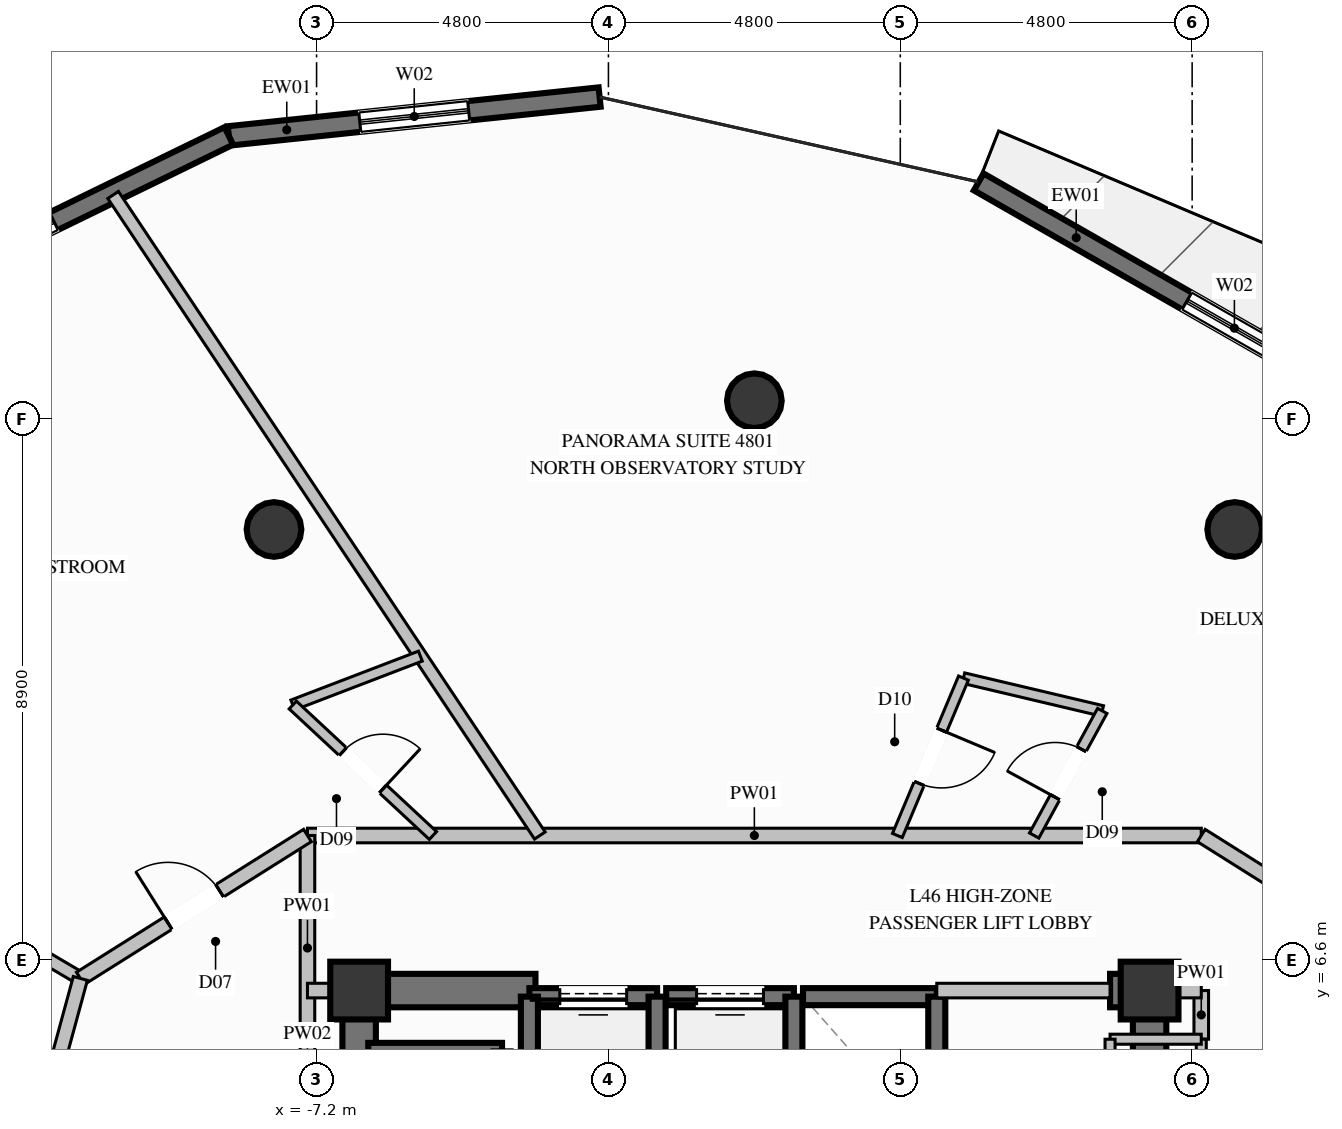
"""IFC4 building model, lengths in metres.
Left out: names, types, materials, properties, quantities, classifications, styles, units other than length and angle.
Written with IfcOpenShell. Run it as: python <this file> out.ifc"""

import sys

from ifc_helpers import new_model, si_unit, direction, frame, frame_2d, origin, origin_2d, place, context, subcontext, project, spatial, rectangle, circle, extrude, element, fill, save


model = new_model("IFC4")
c1 = context("Model", 3, precision=1e-05, world=origin(), true_north=direction((0.0, 1.0)))
c2 = subcontext(c1, "Body", "Model", "MODEL_VIEW")
j1 = project(units=[si_unit("LENGTHUNIT", "METRE"), si_unit("PLANEANGLEUNIT", "RADIAN")], contexts=[c1])
p1 = place(None, origin())
s1 = spatial("IfcSite", under=j1, at=p1, CompositionType="ELEMENT")
p2 = place(p1, origin())
s2 = spatial("IfcBuilding", under=s1, at=p2, CompositionType="ELEMENT")
p3 = place(p2, frame((0.0, 0.0, 180.4)))
s3 = spatial("IfcBuildingStorey", under=s2, at=p3, CompositionType="ELEMENT", Elevation=180.4)
for number, where, z_axis, x_axis in (
    (1, (6.5, 6.1, 0.0), (0.0, 0.0, 1.0), (1.0, 0.0, 0.0)),
    (2, (-6.5, 6.1, 0.0), (0.0, 0.0, 1.0), (1.0, 0.0, 0.0)),
):
    element("IfcColumn", number, at=place(p3, frame(where, z_axis=z_axis, x_axis=x_axis)), inside=s3, PredefinedType="COLUMN", context=c2, shape_type="SweptSolid", body=[
        extrude(rectangle(XDim=0.95, YDim=0.95, at=origin_2d()), origin(), (0.0, 0.0, 1.0), 3.6),
    ])
p4 = place(p3, frame((-6.225, 6.1, 0.0), z_axis=(0.0, 0.0, 1.0), x_axis=(1.0, 0.0, 0.0)))
e3 = element("IfcWall", 3, at=p4, inside=s3, PredefinedType="SHEAR", context=c2, shape_type="SweptSolid", body=[
    extrude(rectangle(XDim=2.625, YDim=0.55, at=frame_2d((1.312, 0.0))), origin(), (0.0, 0.0, 1.0), 3.6),
])
p5 = place(p3, frame((5.85, 6.1, 0.0), z_axis=(0.0, 0.0, 1.0), x_axis=(1.0, 0.0, 0.0)))
e4 = element("IfcWall", 4, at=p5, inside=s3, PredefinedType="SHEAR", context=c2, shape_type="SweptSolid", body=[
    extrude(rectangle(XDim=0.375, YDim=0.55, at=frame_2d((0.188, 0.0))), origin(), (0.0, 0.0, 1.0), 3.6),
])
p6 = place(p3, frame((-6.5, 2.35, 0.0), z_axis=(0.0, 0.0, 1.0), x_axis=(0.0, 1.0, 0.0)))
e5 = element("IfcWall", 5, at=p6, inside=s3, PredefinedType="SHEAR", context=c2, shape_type="SweptSolid", body=[
    extrude(rectangle(XDim=4.025, YDim=0.55, at=frame_2d((2.012, 0.0))), origin(), (0.0, 0.0, 1.0), 3.6),
])
p7 = place(p3, frame((6.5, 3.35, 0.0), z_axis=(0.0, 0.0, 1.0), x_axis=(0.0, 1.0, 0.0)))
e6 = element("IfcWall", 6, at=p7, inside=s3, PredefinedType="SHEAR", context=c2, shape_type="SweptSolid", body=[
    extrude(rectangle(XDim=3.025, YDim=0.55, at=frame_2d((1.512, 0.0))), origin(), (0.0, 0.0, 1.0), 3.6),
])
for number, where, z_axis, x_axis in (
    (7, (7.9, 13.683, 0.0), (0.0, 0.0, 1.0), (1.0, 0.0, 0.0)),
    (8, (0.0, 15.8, 0.0), (0.0, 0.0, 1.0), (1.0, 0.0, 0.0)),
    (9, (-7.9, 13.683, 0.0), (0.0, 0.0, 1.0), (1.0, 0.0, 0.0)),
):
    element("IfcColumn", number, at=place(p3, frame(where, z_axis=z_axis, x_axis=x_axis)), inside=s3, PredefinedType="COLUMN", context=c2, shape_type="SweptSolid", body=[
        extrude(circle(Radius=0.45, at=origin_2d()), origin(), (0.0, 0.0, 1.0), 3.6),
    ])
p8 = place(p3, frame((3.69, 19.398, 0.0), z_axis=(0.0, 0.0, 1.0), x_axis=(0.868052920032, -0.496471678974, 0.0)))
e10 = element("IfcWall", 10, at=p8, inside=s3, PredefinedType="SOLIDWALL", context=c2, shape_type="SweptSolid", body=[
    extrude(rectangle(XDim=6.637, YDim=0.32, at=frame_2d((3.318, 0.0))), origin(), (0.0, 0.0, 1.0), 3.36),
])
p9 = place(p8, frame((3.944, 0.0, 0.35)))
e11 = element("IfcOpeningElement", 11, at=p9, cuts=e10, PredefinedType="OPENING", context=c2, shape_type="SweptSolid", body=[
    extrude(rectangle(XDim=1.8, YDim=2.6, at=frame_2d((0.9, 1.3))), frame((0.0, 0.17, 0.0), z_axis=(0.0, -1.0, 0.0), x_axis=(1.0, 0.0, 0.0)), (0.0, 0.0, 1.0), 0.34),
])
p10 = place(p3, frame((-8.643, 20.155, 0.0), z_axis=(0.0, 0.0, 1.0), x_axis=(0.994556170884, 0.104201837585, 0.0)))
e12 = element("IfcWall", 12, at=p10, inside=s3, PredefinedType="SOLIDWALL", context=c2, shape_type="SweptSolid", body=[
    extrude(rectangle(XDim=6.132, YDim=0.32, at=frame_2d((3.066, 0.0))), origin(), (0.0, 0.0, 1.0), 3.36),
])
p11 = place(p10, frame((2.166, 0.0, 0.35)))
e13 = element("IfcOpeningElement", 13, at=p11, cuts=e12, PredefinedType="OPENING", context=c2, shape_type="SweptSolid", body=[
    extrude(rectangle(XDim=1.8, YDim=2.6, at=frame_2d((0.9, 1.3))), frame((0.0, 0.17, 0.0), z_axis=(0.0, -1.0, 0.0), x_axis=(1.0, 0.0, 0.0)), (0.0, 0.0, 1.0), 0.34),
])
p12 = place(p3, frame((-14.008, 17.542, 0.0), z_axis=(0.0, 0.0, 1.0), x_axis=(0.899034471399, 0.437877858811, 0.0)))
e14 = element("IfcWall", 14, at=p12, inside=s3, PredefinedType="SOLIDWALL", context=c2, shape_type="SweptSolid", body=[
    extrude(rectangle(XDim=5.968, YDim=0.32, at=frame_2d((2.984, 0.0))), origin(), (0.0, 0.0, 1.0), 3.36),
])
p13 = place(p12, frame((0.966, 0.0, 0.35)))
e15 = element("IfcOpeningElement", 15, at=p13, cuts=e14, PredefinedType="OPENING", context=c2, shape_type="SweptSolid", body=[
    extrude(rectangle(XDim=1.8, YDim=2.6, at=frame_2d((0.9, 1.3))), frame((0.0, 0.17, 0.0), z_axis=(0.0, -1.0, 0.0), x_axis=(1.0, 0.0, 0.0)), (0.0, 0.0, 1.0), 0.34),
])
p14 = place(p3, frame((-1.6, 6.0, 0.0), z_axis=(0.0, 0.0, 1.0), x_axis=(-1.0, 0.0, 0.0)))
e16 = element("IfcWall", 16, at=p14, inside=s3, PredefinedType="SOLIDWALL", context=c2, shape_type="SweptSolid", body=[
    extrude(rectangle(XDim=2.1, YDim=0.28, at=frame_2d((1.05, 0.0))), origin(), (0.0, 0.0, 1.0), 3.36),
])
p15 = place(p14, frame((0.5, 0.0, 0.0)))
e17 = element("IfcOpeningElement", 17, at=p15, cuts=e16, PredefinedType="OPENING", context=c2, shape_type="SweptSolid", body=[
    extrude(rectangle(XDim=1.1, YDim=2.2, at=frame_2d((0.55, 1.1))), frame((0.0, 0.15, 0.0), z_axis=(0.0, -1.0, 0.0), x_axis=(1.0, 0.0, 0.0)), (0.0, 0.0, 1.0), 0.3),
])
for number, where, z_axis, x_axis in (
    (18, (-3.7, 6.0, 0.0), (0.0, 0.0, 1.0), (0.0, -1.0, 0.0)),
    (19, (-1.6, 3.5, 0.0), (0.0, 0.0, 1.0), (0.0, 1.0, 0.0)),
):
    element("IfcWall", number, at=place(p3, frame(where, z_axis=z_axis, x_axis=x_axis)), inside=s3, PredefinedType="SOLIDWALL", context=c2, shape_type="SweptSolid", body=[
        extrude(rectangle(XDim=2.5, YDim=0.28, at=frame_2d((1.25, 0.0))), origin(), (0.0, 0.0, 1.0), 3.36),
    ])
p16 = place(p3, frame((0.65, 6.0, 0.0), z_axis=(0.0, 0.0, 1.0), x_axis=(-1.0, 0.0, 0.0)))
e20 = element("IfcWall", 20, at=p16, inside=s3, PredefinedType="SOLIDWALL", context=c2, shape_type="SweptSolid", body=[
    extrude(rectangle(XDim=2.1, YDim=0.28, at=frame_2d((1.05, 0.0))), origin(), (0.0, 0.0, 1.0), 3.36),
])
p17 = place(p16, frame((0.5, 0.0, 0.0)))
e21 = element("IfcOpeningElement", 21, at=p17, cuts=e20, PredefinedType="OPENING", context=c2, shape_type="SweptSolid", body=[
    extrude(rectangle(XDim=1.1, YDim=2.2, at=frame_2d((0.55, 1.1))), frame((0.0, 0.15, 0.0), z_axis=(0.0, -1.0, 0.0), x_axis=(1.0, 0.0, 0.0)), (0.0, 0.0, 1.0), 0.3),
])
p18 = place(p3, frame((0.65, 3.5, 0.0), z_axis=(0.0, 0.0, 1.0), x_axis=(0.0, 1.0, 0.0)))
e22 = element("IfcWall", 22, at=p18, inside=s3, PredefinedType="SOLIDWALL", context=c2, shape_type="SweptSolid", body=[
    extrude(rectangle(XDim=2.5, YDim=0.28, at=frame_2d((1.25, 0.0))), origin(), (0.0, 0.0, 1.0), 3.36),
])
p19 = place(p3, frame((3.0, 6.0, 0.0), z_axis=(0.0, 0.0, 1.0), x_axis=(-1.0, 0.0, 0.0)))
e23 = element("IfcWall", 23, at=p19, inside=s3, PredefinedType="SOLIDWALL", context=c2, shape_type="SweptSolid", body=[
    extrude(rectangle(XDim=2.2, YDim=0.28, at=frame_2d((1.1, 0.0))), origin(), (0.0, 0.0, 1.0), 3.36),
])
p20 = place(p3, frame((3.0, 3.5, 0.0), z_axis=(0.0, 0.0, 1.0), x_axis=(0.0, 1.0, 0.0)))
e24 = element("IfcWall", 24, at=p20, inside=s3, PredefinedType="SOLIDWALL", context=c2, shape_type="SweptSolid", body=[
    extrude(rectangle(XDim=2.5, YDim=0.28, at=frame_2d((1.25, 0.0))), origin(), (0.0, 0.0, 1.0), 3.36),
])
p21 = place(p3, frame((-4.15, 5.1, 0.0), z_axis=(0.0, 0.0, 1.0), x_axis=(-1.0, 0.0, 0.0)))
e25 = element("IfcWall", 25, at=p21, inside=s3, PredefinedType="SOLIDWALL", context=c2, shape_type="SweptSolid", body=[
    extrude(rectangle(XDim=2.2, YDim=0.28, at=frame_2d((1.1, 0.0))), origin(), (0.0, 0.0, 1.0), 3.36),
])
p22 = place(p3, frame((-7.35, 8.65, 0.0), z_axis=(0.0, 0.0, 1.0), x_axis=(1.0, 0.0, 0.0)))
e26 = element("IfcWall", 26, at=p22, inside=s3, PredefinedType="PARTITIONING", context=c2, shape_type="SweptSolid", body=[
    extrude(rectangle(XDim=14.7, YDim=0.24, at=frame_2d((7.35, 0.0))), origin(), (0.0, 0.0, 1.0), 3.36),
])
p23 = place(p3, frame((3.0, 6.1, 0.0), z_axis=(0.0, 0.0, 1.0), x_axis=(1.0, 0.0, 0.0)))
e27 = element("IfcWall", 27, at=p23, inside=s3, PredefinedType="PARTITIONING", context=c2, shape_type="SweptSolid", body=[
    extrude(rectangle(XDim=2.85, YDim=0.24, at=frame_2d((1.425, 0.0))), origin(), (0.0, 0.0, 1.0), 2.445),
])
p24 = place(p3, frame((7.35, 5.3, 0.0), z_axis=(0.0, 0.0, 1.0), x_axis=(0.0, 1.0, 0.0)))
e28 = element("IfcWall", 28, at=p24, inside=s3, PredefinedType="PARTITIONING", context=c2, shape_type="SweptSolid", body=[
    extrude(rectangle(XDim=0.8, YDim=0.24, at=frame_2d((0.4, 0.0))), origin(), (0.0, 0.0, 1.0), 2.445),
])
p25 = place(p3, frame((6.5, 6.1, 0.0), z_axis=(0.0, 0.0, 1.0), x_axis=(1.0, 0.0, 0.0)))
e29 = element("IfcWall", 29, at=p25, inside=s3, PredefinedType="PARTITIONING", context=c2, shape_type="SweptSolid", body=[
    extrude(rectangle(XDim=0.85, YDim=0.24, at=frame_2d((0.425, 0.0))), origin(), (0.0, 0.0, 1.0), 2.801),
])
p26 = place(p3, frame((-7.35, 4.95, 0.0), z_axis=(0.0, 0.0, 1.0), x_axis=(0.0, 1.0, 0.0)))
e30 = element("IfcWall", 30, at=p26, inside=s3, PredefinedType="PARTITIONING", context=c2, shape_type="SweptSolid", body=[
    extrude(rectangle(XDim=3.7, YDim=0.24, at=frame_2d((1.85, 0.0))), origin(), (0.0, 0.0, 1.0), 2.445),
])
p27 = place(p3, frame((-7.35, 6.1, 0.0), z_axis=(0.0, 0.0, 1.0), x_axis=(1.0, 0.0, 0.0)))
e31 = element("IfcWall", 31, at=p27, inside=s3, PredefinedType="PARTITIONING", context=c2, shape_type="SweptSolid", body=[
    extrude(rectangle(XDim=0.85, YDim=0.24, at=frame_2d((0.425, 0.0))), origin(), (0.0, 0.0, 1.0), 2.801),
])
p28 = place(p3, frame((7.35, 2.75, 0.0), z_axis=(0.0, 0.0, 1.0), x_axis=(0.0, 1.0, 0.0)))
e32 = element("IfcWall", 32, at=p28, inside=s3, PredefinedType="PARTITIONING", context=c2, shape_type="SweptSolid", body=[
    extrude(rectangle(XDim=2.55, YDim=0.165, at=frame_2d((1.275, 0.0))), origin(), (0.0, 0.0, 1.0), 3.36),
])
p29 = place(p28, frame((0.75, 0.0, 0.0)))
e33 = element("IfcOpeningElement", 33, at=p29, cuts=e32, PredefinedType="OPENING", context=c2, shape_type="SweptSolid", body=[
    extrude(rectangle(XDim=1.05, YDim=2.15, at=frame_2d((0.525, 1.075))), frame((0.0, 0.093, 0.0), z_axis=(0.0, -1.0, 0.0), x_axis=(1.0, 0.0, 0.0)), (0.0, 0.0, 1.0), 0.185),
])
p30 = place(p3, frame((7.35, 5.3, 0.0), z_axis=(0.0, 0.0, 1.0), x_axis=(-1.0, 0.0, 0.0)))
e34 = element("IfcWall", 34, at=p30, inside=s3, PredefinedType="PARTITIONING", context=c2, shape_type="SweptSolid", body=[
    extrude(rectangle(XDim=1.5, YDim=0.165, at=frame_2d((0.75, 0.0))), origin(), (0.0, 0.0, 1.0), 2.445),
])
p31 = place(p3, frame((5.85, 5.3, 0.0), z_axis=(0.0, 0.0, 1.0), x_axis=(0.0, -1.0, 0.0)))
e35 = element("IfcWall", 35, at=p31, inside=s3, PredefinedType="PARTITIONING", context=c2, shape_type="SweptSolid", body=[
    extrude(rectangle(XDim=2.55, YDim=0.165, at=frame_2d((1.275, 0.0))), origin(), (0.0, 0.0, 1.0), 2.445),
])
p32 = place(p3, frame((-11.085, 6.3, 0.0), z_axis=(0.0, 0.0, 1.0), x_axis=(-0.86133622593, 0.508035339225, 0.0)))
e36 = element("IfcWall", 36, at=p32, inside=s3, PredefinedType="PARTITIONING", context=c2, shape_type="SweptSolid", body=[
    extrude(rectangle(XDim=2.584, YDim=0.21, at=frame_2d((1.292, 0.0))), origin(), (0.0, 0.0, 1.0), 2.801),
])
p33 = place(p3, frame((3.439, 11.239, 0.0), z_axis=(0.0, 0.0, 1.0), x_axis=(0.973143510765, -0.230199277704, 0.0)))
e37 = element("IfcWall", 37, at=p33, inside=s3, PredefinedType="PLUMBINGWALL", context=c2, shape_type="SweptSolid", body=[
    extrude(rectangle(XDim=2.346, YDim=0.175, at=frame_2d((1.173, 0.0))), origin(), (0.0, 0.0, 1.0), 3.36),
])
p34 = place(p3, frame((3.439, 11.239, 0.0), z_axis=(0.0, 0.0, 1.0), x_axis=(-0.387077273479, -0.922047278807, 0.0)))
e38 = element("IfcWall", 38, at=p34, inside=s3, PredefinedType="PLUMBINGWALL", context=c2, shape_type="SweptSolid", body=[
    extrude(rectangle(XDim=2.808, YDim=0.175, at=frame_2d((1.404, 0.0))), origin(), (0.0, 0.0, 1.0), 3.36),
])
p35 = place(p34, frame((0.929, 0.0, 0.0)))
e39 = element("IfcOpeningElement", 39, at=p35, cuts=e38, PredefinedType="OPENING", context=c2, shape_type="SweptSolid", body=[
    extrude(rectangle(XDim=0.95, YDim=2.1, at=frame_2d((0.475, 1.05))), frame((0.0, 0.098, 0.0), z_axis=(0.0, -1.0, 0.0), x_axis=(1.0, 0.0, 0.0)), (0.0, 0.0, 1.0), 0.195),
])
p36 = place(p3, frame((4.602, 8.65, 0.0), z_axis=(0.0, 0.0, 1.0), x_axis=(0.479577167617, 0.877499709573, 0.0)))
e40 = element("IfcWall", 40, at=p36, inside=s3, PredefinedType="PLUMBINGWALL", context=c2, shape_type="SweptSolid", body=[
    extrude(rectangle(XDim=2.335, YDim=0.175, at=frame_2d((1.167, 0.0))), origin(), (0.0, 0.0, 1.0), 3.36),
])
p37 = place(p36, frame((0.718, 0.0, 0.0)))
e41 = element("IfcOpeningElement", 41, at=p37, cuts=e40, PredefinedType="OPENING", context=c2, shape_type="SweptSolid", body=[
    extrude(rectangle(XDim=0.9, YDim=2.1, at=frame_2d((0.45, 1.05))), frame((0.0, 0.098, 0.0), z_axis=(0.0, -1.0, 0.0), x_axis=(1.0, 0.0, 0.0)), (0.0, 0.0, 1.0), 0.195),
])
p38 = place(p3, frame((7.35, 8.65, 0.0), z_axis=(0.0, 0.0, 1.0), x_axis=(0.846409267484, -0.532532958526, 0.0)))
e42 = element("IfcWall", 42, at=p38, inside=s3, PredefinedType="PARTITIONING", context=c2, shape_type="SweptSolid", body=[
    extrude(rectangle(XDim=4.413, YDim=0.24, at=frame_2d((2.206, 0.0))), origin(), (0.0, 0.0, 1.0), 3.36),
])
p39 = place(p38, frame((1.706, 0.0, 0.0)))
e43 = element("IfcOpeningElement", 43, at=p39, cuts=e42, PredefinedType="OPENING", context=c2, shape_type="SweptSolid", body=[
    extrude(rectangle(XDim=1.0, YDim=2.2, at=frame_2d((0.5, 1.1))), frame((0.0, 0.13, 0.0), z_axis=(0.0, -1.0, 0.0), x_axis=(1.0, 0.0, 0.0)), (0.0, 0.0, 1.0), 0.26),
])
p40 = place(p3, frame((-3.528, 8.65, 0.0), z_axis=(0.0, 0.0, 1.0), x_axis=(-0.554428653403, 0.832231258898, 0.0)))
e44 = element("IfcWall", 44, at=p40, inside=s3, PredefinedType="PARTITIONING", context=c2, shape_type="SweptSolid", body=[
    extrude(rectangle(XDim=12.658, YDim=0.21, at=frame_2d((6.329, 0.0))), origin(), (0.0, 0.0, 1.0), 3.36),
])
p41 = place(p3, frame((-7.591, 10.796, 0.0), z_axis=(0.0, 0.0, 1.0), x_axis=(0.933759431782, 0.357901276273, 0.0)))
e45 = element("IfcWall", 45, at=p41, inside=s3, PredefinedType="PLUMBINGWALL", context=c2, shape_type="SweptSolid", body=[
    extrude(rectangle(XDim=2.247, YDim=0.175, at=frame_2d((1.124, 0.0))), origin(), (0.0, 0.0, 1.0), 3.36),
])
p42 = place(p3, frame((-7.591, 10.796, 0.0), z_axis=(0.0, 0.0, 1.0), x_axis=(0.731925968359, -0.681384162453, 0.0)))
e46 = element("IfcWall", 46, at=p42, inside=s3, PredefinedType="PLUMBINGWALL", context=c2, shape_type="SweptSolid", body=[
    extrude(rectangle(XDim=3.149, YDim=0.175, at=frame_2d((1.575, 0.0))), origin(), (0.0, 0.0, 1.0), 3.36),
])
p43 = place(p42, frame((1.125, 0.0, 0.0)))
e47 = element("IfcOpeningElement", 47, at=p43, cuts=e46, PredefinedType="OPENING", context=c2, shape_type="SweptSolid", body=[
    extrude(rectangle(XDim=0.9, YDim=2.1, at=frame_2d((0.45, 1.05))), frame((0.0, 0.098, 0.0), z_axis=(0.0, -1.0, 0.0), x_axis=(1.0, 0.0, 0.0)), (0.0, 0.0, 1.0), 0.195),
])
p44 = place(p3, frame((-11.085, 6.3, 0.0), z_axis=(0.0, 0.0, 1.0), x_axis=(0.846409267484, 0.532532958526, 0.0)))
e48 = element("IfcWall", 48, at=p44, inside=s3, PredefinedType="PARTITIONING", context=c2, shape_type="SweptSolid", body=[
    extrude(rectangle(XDim=4.413, YDim=0.24, at=frame_2d((2.206, 0.0))), origin(), (0.0, 0.0, 1.0), 3.36),
])
p45 = place(p44, frame((1.706, 0.0, 0.0)))
e49 = element("IfcOpeningElement", 49, at=p45, cuts=e48, PredefinedType="OPENING", context=c2, shape_type="SweptSolid", body=[
    extrude(rectangle(XDim=1.0, YDim=2.2, at=frame_2d((0.5, 1.1))), frame((0.0, 0.13, 0.0), z_axis=(0.0, -1.0, 0.0), x_axis=(1.0, 0.0, 0.0)), (0.0, 0.0, 1.0), 0.26),
])
p46 = place(p3, frame((-11.085, 6.3, 0.0), z_axis=(0.0, 0.0, 1.0), x_axis=(-0.262552356383, -0.964917747872, 0.0)))
e50 = element("IfcWall", 50, at=p46, inside=s3, PredefinedType="PARTITIONING", context=c2, shape_type="SweptSolid", body=[
    extrude(rectangle(XDim=2.742, YDim=0.24, at=frame_2d((1.371, 0.0))), origin(), (0.0, 0.0, 1.0), 3.36),
])
p47 = place(p9, origin())
e51 = element("IfcWindow", 51, at=p47, inside=s3, PartitioningType="SINGLE_PANEL", PredefinedType="WINDOW", context=c2, shape_type="SweptSolid", body=[
    extrude(rectangle(XDim=1.8, YDim=2.6, at=frame_2d((0.9, 1.3))), frame((0.0, 0.03, 0.0), z_axis=(0.0, -1.0, 0.0), x_axis=(1.0, 0.0, 0.0)), (0.0, 0.0, 1.0), 0.06),
])
fill(e11, e51)
p48 = place(p11, origin())
e52 = element("IfcWindow", 52, at=p48, inside=s3, PartitioningType="SINGLE_PANEL", PredefinedType="WINDOW", context=c2, shape_type="SweptSolid", body=[
    extrude(rectangle(XDim=1.8, YDim=2.6, at=frame_2d((0.9, 1.3))), frame((0.0, 0.03, 0.0), z_axis=(0.0, -1.0, 0.0), x_axis=(1.0, 0.0, 0.0)), (0.0, 0.0, 1.0), 0.06),
])
fill(e13, e52)
p49 = place(p13, origin())
e53 = element("IfcWindow", 53, at=p49, inside=s3, PartitioningType="SINGLE_PANEL", PredefinedType="WINDOW", context=c2, shape_type="SweptSolid", body=[
    extrude(rectangle(XDim=1.8, YDim=2.6, at=frame_2d((0.9, 1.3))), frame((0.0, 0.03, 0.0), z_axis=(0.0, -1.0, 0.0), x_axis=(1.0, 0.0, 0.0)), (0.0, 0.0, 1.0), 0.06),
])
fill(e15, e53)
p50 = place(p15, origin())
e54 = element("IfcDoor", 54, at=p50, inside=s3, OperationType="SLIDING_TO_LEFT", PredefinedType="DOOR", context=c2, shape_type="SweptSolid", body=[
    extrude(rectangle(XDim=1.1, YDim=2.2, at=frame_2d((0.55, 1.1))), frame((0.0, 0.025, 0.0), z_axis=(0.0, -1.0, 0.0), x_axis=(1.0, 0.0, 0.0)), (0.0, 0.0, 1.0), 0.05),
])
fill(e17, e54)
p51 = place(p17, origin())
e55 = element("IfcDoor", 55, at=p51, inside=s3, OperationType="SLIDING_TO_LEFT", PredefinedType="DOOR", context=c2, shape_type="SweptSolid", body=[
    extrude(rectangle(XDim=1.1, YDim=2.2, at=frame_2d((0.55, 1.1))), frame((0.0, 0.025, 0.0), z_axis=(0.0, -1.0, 0.0), x_axis=(1.0, 0.0, 0.0)), (0.0, 0.0, 1.0), 0.05),
])
fill(e21, e55)
p52 = place(p37, origin())
e56 = element("IfcDoor", 56, at=p52, inside=s3, OperationType="SINGLE_SWING_LEFT", PredefinedType="DOOR", context=c2, shape_type="SweptSolid", body=[
    extrude(rectangle(XDim=0.9, YDim=2.1, at=frame_2d((0.45, 1.05))), frame((0.0, 0.025, 0.0), z_axis=(0.0, -1.0, 0.0), x_axis=(1.0, 0.0, 0.0)), (0.0, 0.0, 1.0), 0.05),
])
fill(e41, e56)
p53 = place(p35, origin())
e57 = element("IfcDoor", 57, at=p53, inside=s3, OperationType="SINGLE_SWING_LEFT", PredefinedType="DOOR", context=c2, shape_type="SweptSolid", body=[
    extrude(rectangle(XDim=0.95, YDim=2.1, at=frame_2d((0.475, 1.05))), frame((0.0, 0.025, 0.0), z_axis=(0.0, -1.0, 0.0), x_axis=(1.0, 0.0, 0.0)), (0.0, 0.0, 1.0), 0.05),
])
fill(e39, e57)
p54 = place(p43, origin())
e58 = element("IfcDoor", 58, at=p54, inside=s3, OperationType="SINGLE_SWING_RIGHT", PredefinedType="DOOR", context=c2, shape_type="SweptSolid", body=[
    extrude(rectangle(XDim=0.9, YDim=2.1, at=frame_2d((0.45, 1.05))), frame((0.0, 0.025, 0.0), z_axis=(0.0, -1.0, 0.0), x_axis=(1.0, 0.0, 0.0)), (0.0, 0.0, 1.0), 0.05),
])
fill(e47, e58)
p55 = place(p45, origin())
e59 = element("IfcDoor", 59, at=p55, inside=s3, OperationType="SINGLE_SWING_LEFT", PredefinedType="DOOR", context=c2, shape_type="SweptSolid", body=[
    extrude(rectangle(XDim=1.0, YDim=2.2, at=frame_2d((0.5, 1.1))), frame((0.0, 0.025, 0.0), z_axis=(0.0, -1.0, 0.0), x_axis=(1.0, 0.0, 0.0)), (0.0, 0.0, 1.0), 0.05),
])
fill(e49, e59)
save(model, sys.argv[1])
